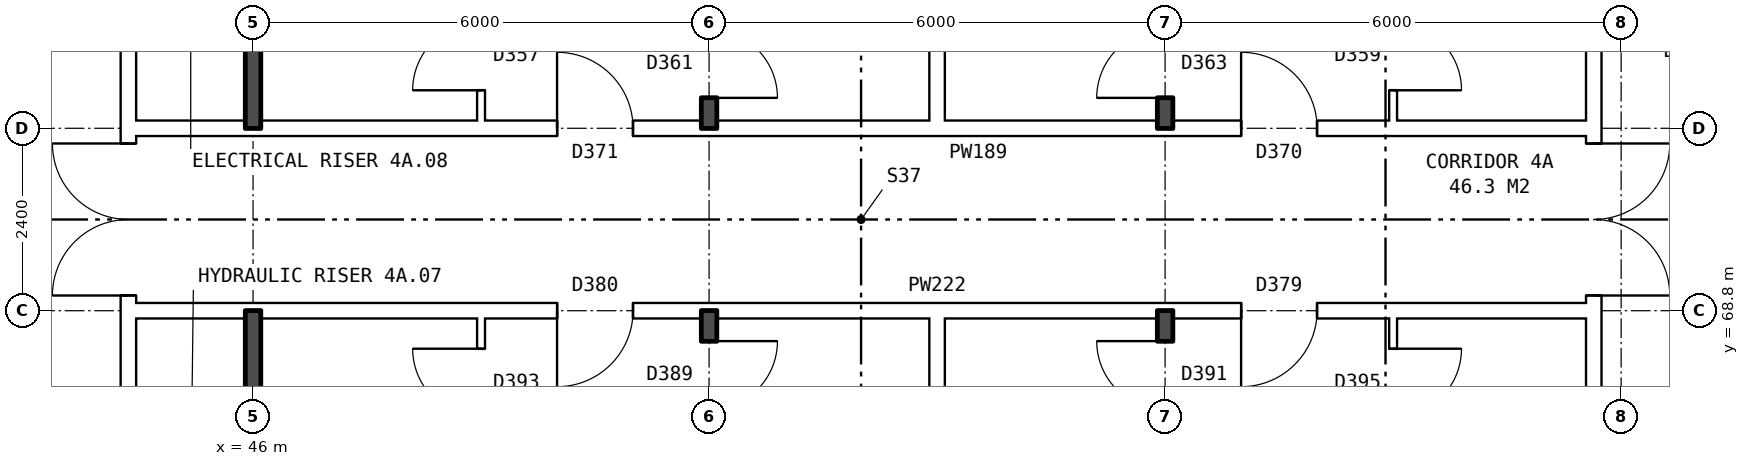
"""IFC4 building model, lengths in metres.
Left out: names, types, materials, properties, quantities, classifications, styles, units other than length and angle.
Written with IfcOpenShell. Run it as: python <this file> out.ifc"""

import sys

from ifc_helpers import new_model, si_unit, direction, frame, frame_2d, origin, place, context, subcontext, project, spatial, rectangle, extrude, element, fill, save


model = new_model("IFC4")
c1 = context("Model", 3, precision=1e-05, world=origin(), true_north=direction((0.0, 1.0)))
c2 = subcontext(c1, "Body", "Model", "MODEL_VIEW")
j1 = project(units=[si_unit("LENGTHUNIT", "METRE"), si_unit("PLANEANGLEUNIT", "RADIAN")], contexts=[c1])
p1 = place(None, origin())
s1 = spatial("IfcSite", under=j1, at=p1, CompositionType="ELEMENT")
p2 = place(p1, origin())
s2 = spatial("IfcBuilding", under=s1, at=p2, CompositionType="ELEMENT")
p3 = place(p2, frame((0.0, 0.0, 19.5)))
s3 = spatial("IfcBuildingStorey", under=s2, at=p3, CompositionType="ELEMENT", Elevation=19.5)
p4 = place(p3, frame((63.64, 63.9, 0.0), z_axis=(0.0, 0.0, 1.0), x_axis=(0.0, 1.0, 0.0)))
e1 = element("IfcWall", 1, at=p4, inside=s3, PredefinedType="PARTITIONING", context=c2, shape_type="SweptSolid", body=[
    extrude(rectangle(XDim=12.2, YDim=0.2, at=frame_2d((6.1, 0.0))), origin(), (0.0, 0.0, 1.0), 2.85),
])
p5 = place(p4, frame((5.1, 0.0, 0.0)))
e2 = element("IfcOpeningElement", 2, at=p5, cuts=e1, PredefinedType="OPENING", context=c2, shape_type="SweptSolid", body=[
    extrude(rectangle(XDim=2.0, YDim=2.1, at=frame_2d((1.0, 1.05))), frame((0.0, 0.11, 0.0), z_axis=(0.0, -1.0, 0.0), x_axis=(1.0, 0.0, 0.0)), (0.0, 0.0, 1.0), 0.22),
])
p6 = place(p3, frame((44.36, 63.9, 0.0), z_axis=(0.0, 0.0, 1.0), x_axis=(0.0, 1.0, 0.0)))
e3 = element("IfcWall", 3, at=p6, inside=s3, PredefinedType="PARTITIONING", context=c2, shape_type="SweptSolid", body=[
    extrude(rectangle(XDim=12.2, YDim=0.2, at=frame_2d((6.1, 0.0))), origin(), (0.0, 0.0, 1.0), 2.85),
])
p7 = place(p6, frame((5.1, 0.0, 0.0)))
e4 = element("IfcOpeningElement", 4, at=p7, cuts=e3, PredefinedType="OPENING", context=c2, shape_type="SweptSolid", body=[
    extrude(rectangle(XDim=2.0, YDim=2.1, at=frame_2d((1.0, 1.05))), frame((0.0, 0.11, 0.0), z_axis=(0.0, -1.0, 0.0), x_axis=(1.0, 0.0, 0.0)), (0.0, 0.0, 1.0), 0.22),
])
p8 = place(p3, frame((44.36, 68.8, 0.0), z_axis=(0.0, 0.0, 1.0), x_axis=(1.0, 0.0, 0.0)))
e5 = element("IfcWall", 5, at=p8, inside=s3, PredefinedType="PARTITIONING", context=c2, shape_type="SweptSolid", body=[
    extrude(rectangle(XDim=19.28, YDim=0.2, at=frame_2d((9.64, 0.0))), origin(), (0.0, 0.0, 1.0), 2.85),
])
p9 = place(p8, frame((14.64, 0.0, 0.0)))
e6 = element("IfcOpeningElement", 6, at=p9, cuts=e5, PredefinedType="OPENING", context=c2, shape_type="SweptSolid", body=[
    extrude(rectangle(XDim=1.0, YDim=2.1, at=frame_2d((0.5, 1.05))), frame((0.0, 0.11, 0.0), z_axis=(0.0, -1.0, 0.0), x_axis=(1.0, 0.0, 0.0)), (0.0, 0.0, 1.0), 0.22),
])
p10 = place(p8, frame((5.64, 0.0, 0.0)))
e7 = element("IfcOpeningElement", 7, at=p10, cuts=e5, PredefinedType="OPENING", context=c2, shape_type="SweptSolid", body=[
    extrude(rectangle(XDim=1.0, YDim=2.1, at=frame_2d((0.5, 1.05))), frame((0.0, 0.11, 0.0), z_axis=(0.0, -1.0, 0.0), x_axis=(1.0, 0.0, 0.0)), (0.0, 0.0, 1.0), 0.22),
])
p11 = place(p3, frame((44.36, 71.2, 0.0), z_axis=(0.0, 0.0, 1.0), x_axis=(1.0, 0.0, 0.0)))
e8 = element("IfcWall", 8, at=p11, inside=s3, PredefinedType="PARTITIONING", context=c2, shape_type="SweptSolid", body=[
    extrude(rectangle(XDim=19.28, YDim=0.2, at=frame_2d((9.64, 0.0))), origin(), (0.0, 0.0, 1.0), 2.85),
])
p12 = place(p11, frame((14.64, 0.0, 0.0)))
e9 = element("IfcOpeningElement", 9, at=p12, cuts=e8, PredefinedType="OPENING", context=c2, shape_type="SweptSolid", body=[
    extrude(rectangle(XDim=1.0, YDim=2.1, at=frame_2d((0.5, 1.05))), frame((0.0, 0.11, 0.0), z_axis=(0.0, -1.0, 0.0), x_axis=(1.0, 0.0, 0.0)), (0.0, 0.0, 1.0), 0.22),
])
p13 = place(p11, frame((5.64, 0.0, 0.0)))
e10 = element("IfcOpeningElement", 10, at=p13, cuts=e8, PredefinedType="OPENING", context=c2, shape_type="SweptSolid", body=[
    extrude(rectangle(XDim=1.0, YDim=2.1, at=frame_2d((0.5, 1.05))), frame((0.0, 0.11, 0.0), z_axis=(0.0, -1.0, 0.0), x_axis=(1.0, 0.0, 0.0)), (0.0, 0.0, 1.0), 0.22),
])
for number, where, z_axis, x_axis in (
    (11, (46.0, 63.8, 0.0), (0.0, 0.0, 1.0), (0.0, 1.0, 0.0)),
    (12, (46.0, 71.2, 0.0), (0.0, 0.0, 1.0), (0.0, 1.0, 0.0)),
):
    element("IfcWall", number, at=place(p3, frame(where, z_axis=z_axis, x_axis=x_axis)), inside=s3, PredefinedType="SOLIDWALL", context=c2, shape_type="SweptSolid", body=[
        extrude(rectangle(XDim=5.0, YDim=0.2, at=frame_2d((2.5, 0.0))), origin(), (0.0, 0.0, 1.0), 2.85),
    ])
p14 = place(p3, frame((49.0, 54.36, 0.0), z_axis=(0.0, 0.0, 1.0), x_axis=(0.0, 1.0, 0.0)))
e13 = element("IfcWall", 13, at=p14, inside=s3, PredefinedType="PARTITIONING", context=c2, shape_type="SweptSolid", body=[
    extrude(rectangle(XDim=14.34, YDim=0.1, at=frame_2d((7.17, 0.0))), origin(), (0.0, 0.0, 1.0), 2.85),
])
p15 = place(p14, frame((6.7, 0.0, 0.0)))
e14 = element("IfcOpeningElement", 14, at=p15, cuts=e13, PredefinedType="OPENING", context=c2, shape_type="SweptSolid", body=[
    extrude(rectangle(XDim=0.9, YDim=2.1, at=frame_2d((0.45, 1.05))), frame((0.0, 0.06, 0.0), z_axis=(0.0, -1.0, 0.0), x_axis=(1.0, 0.0, 0.0)), (0.0, 0.0, 1.0), 0.12),
])
p16 = place(p14, frame((13.04, 0.0, 0.0)))
e15 = element("IfcOpeningElement", 15, at=p16, cuts=e13, PredefinedType="OPENING", context=c2, shape_type="SweptSolid", body=[
    extrude(rectangle(XDim=0.9, YDim=2.1, at=frame_2d((0.45, 1.05))), frame((0.0, 0.06, 0.0), z_axis=(0.0, -1.0, 0.0), x_axis=(1.0, 0.0, 0.0)), (0.0, 0.0, 1.0), 0.12),
])
p17 = place(p3, frame((49.0, 71.3, 0.0), z_axis=(0.0, 0.0, 1.0), x_axis=(0.0, 1.0, 0.0)))
e16 = element("IfcWall", 16, at=p17, inside=s3, PredefinedType="PARTITIONING", context=c2, shape_type="SweptSolid", body=[
    extrude(rectangle(XDim=14.34, YDim=0.1, at=frame_2d((7.17, 0.0))), origin(), (0.0, 0.0, 1.0), 2.85),
])
p18 = place(p17, frame((9.24, 0.0, 0.0)))
e17 = element("IfcOpeningElement", 17, at=p18, cuts=e16, PredefinedType="OPENING", context=c2, shape_type="SweptSolid", body=[
    extrude(rectangle(XDim=0.9, YDim=2.1, at=frame_2d((0.45, 1.05))), frame((0.0, 0.06, 0.0), z_axis=(0.0, -1.0, 0.0), x_axis=(1.0, 0.0, 0.0)), (0.0, 0.0, 1.0), 0.12),
])
p19 = place(p17, frame((0.4, 0.0, 0.0)))
e18 = element("IfcOpeningElement", 18, at=p19, cuts=e16, PredefinedType="OPENING", context=c2, shape_type="SweptSolid", body=[
    extrude(rectangle(XDim=0.9, YDim=2.1, at=frame_2d((0.45, 1.05))), frame((0.0, 0.06, 0.0), z_axis=(0.0, -1.0, 0.0), x_axis=(1.0, 0.0, 0.0)), (0.0, 0.0, 1.0), 0.12),
])
p20 = place(p3, frame((52.0, 54.36, 0.0), z_axis=(0.0, 0.0, 1.0), x_axis=(0.0, 1.0, 0.0)))
e19 = element("IfcWall", 19, at=p20, inside=s3, PredefinedType="SOLIDWALL", context=c2, shape_type="SweptSolid", body=[
    extrude(rectangle(XDim=14.44, YDim=0.2, at=frame_2d((7.22, 0.0))), origin(), (0.0, 0.0, 1.0), 2.85),
])
p21 = place(p20, frame((6.7, 0.0, 0.0)))
e20 = element("IfcOpeningElement", 20, at=p21, cuts=e19, PredefinedType="OPENING", context=c2, shape_type="SweptSolid", body=[
    extrude(rectangle(XDim=0.9, YDim=2.1, at=frame_2d((0.45, 1.05))), frame((0.0, 0.11, 0.0), z_axis=(0.0, -1.0, 0.0), x_axis=(1.0, 0.0, 0.0)), (0.0, 0.0, 1.0), 0.22),
])
p22 = place(p20, frame((13.14, 0.0, 0.0)))
e21 = element("IfcOpeningElement", 21, at=p22, cuts=e19, PredefinedType="OPENING", context=c2, shape_type="SweptSolid", body=[
    extrude(rectangle(XDim=0.9, YDim=2.1, at=frame_2d((0.45, 1.05))), frame((0.0, 0.11, 0.0), z_axis=(0.0, -1.0, 0.0), x_axis=(1.0, 0.0, 0.0)), (0.0, 0.0, 1.0), 0.22),
])
p23 = place(p3, frame((52.0, 71.2, 0.0), z_axis=(0.0, 0.0, 1.0), x_axis=(0.0, 1.0, 0.0)))
e22 = element("IfcWall", 22, at=p23, inside=s3, PredefinedType="SOLIDWALL", context=c2, shape_type="SweptSolid", body=[
    extrude(rectangle(XDim=14.44, YDim=0.2, at=frame_2d((7.22, 0.0))), origin(), (0.0, 0.0, 1.0), 2.85),
])
p24 = place(p23, frame((9.34, 0.0, 0.0)))
e23 = element("IfcOpeningElement", 23, at=p24, cuts=e22, PredefinedType="OPENING", context=c2, shape_type="SweptSolid", body=[
    extrude(rectangle(XDim=0.9, YDim=2.1, at=frame_2d((0.45, 1.05))), frame((0.0, 0.11, 0.0), z_axis=(0.0, -1.0, 0.0), x_axis=(1.0, 0.0, 0.0)), (0.0, 0.0, 1.0), 0.22),
])
p25 = place(p23, frame((0.4, 0.0, 0.0)))
e24 = element("IfcOpeningElement", 24, at=p25, cuts=e22, PredefinedType="OPENING", context=c2, shape_type="SweptSolid", body=[
    extrude(rectangle(XDim=0.9, YDim=2.1, at=frame_2d((0.45, 1.05))), frame((0.0, 0.11, 0.0), z_axis=(0.0, -1.0, 0.0), x_axis=(1.0, 0.0, 0.0)), (0.0, 0.0, 1.0), 0.22),
])
for number, where, z_axis, x_axis in (
    (25, (55.0, 54.36, 0.0), (0.0, 0.0, 1.0), (0.0, 1.0, 0.0)),
    (26, (55.0, 71.3, 0.0), (0.0, 0.0, 1.0), (0.0, 1.0, 0.0)),
):
    element("IfcWall", number, at=place(p3, frame(where, z_axis=z_axis, x_axis=x_axis)), inside=s3, PredefinedType="PARTITIONING", context=c2, shape_type="SweptSolid", body=[
        extrude(rectangle(XDim=14.34, YDim=0.2, at=frame_2d((7.17, 0.0))), origin(), (0.0, 0.0, 1.0), 2.85),
    ])
p26 = place(p3, frame((58.0, 54.36, 0.0), z_axis=(0.0, 0.0, 1.0), x_axis=(0.0, 1.0, 0.0)))
e27 = element("IfcWall", 27, at=p26, inside=s3, PredefinedType="SOLIDWALL", context=c2, shape_type="SweptSolid", body=[
    extrude(rectangle(XDim=14.44, YDim=0.2, at=frame_2d((7.22, 0.0))), origin(), (0.0, 0.0, 1.0), 2.85),
])
p27 = place(p26, frame((7.7, 0.0, 0.0)))
e28 = element("IfcOpeningElement", 28, at=p27, cuts=e27, PredefinedType="OPENING", context=c2, shape_type="SweptSolid", body=[
    extrude(rectangle(XDim=0.9, YDim=2.1, at=frame_2d((0.45, 1.05))), frame((0.0, 0.11, 0.0), z_axis=(0.0, -1.0, 0.0), x_axis=(1.0, 0.0, 0.0)), (0.0, 0.0, 1.0), 0.22),
])
p28 = place(p26, frame((13.14, 0.0, 0.0)))
e29 = element("IfcOpeningElement", 29, at=p28, cuts=e27, PredefinedType="OPENING", context=c2, shape_type="SweptSolid", body=[
    extrude(rectangle(XDim=0.9, YDim=2.1, at=frame_2d((0.45, 1.05))), frame((0.0, 0.11, 0.0), z_axis=(0.0, -1.0, 0.0), x_axis=(1.0, 0.0, 0.0)), (0.0, 0.0, 1.0), 0.22),
])
p29 = place(p3, frame((58.0, 71.2, 0.0), z_axis=(0.0, 0.0, 1.0), x_axis=(0.0, 1.0, 0.0)))
e30 = element("IfcWall", 30, at=p29, inside=s3, PredefinedType="SOLIDWALL", context=c2, shape_type="SweptSolid", body=[
    extrude(rectangle(XDim=14.44, YDim=0.2, at=frame_2d((7.22, 0.0))), origin(), (0.0, 0.0, 1.0), 2.85),
])
p30 = place(p29, frame((9.34, 0.0, 0.0)))
e31 = element("IfcOpeningElement", 31, at=p30, cuts=e30, PredefinedType="OPENING", context=c2, shape_type="SweptSolid", body=[
    extrude(rectangle(XDim=0.9, YDim=2.1, at=frame_2d((0.45, 1.05))), frame((0.0, 0.11, 0.0), z_axis=(0.0, -1.0, 0.0), x_axis=(1.0, 0.0, 0.0)), (0.0, 0.0, 1.0), 0.22),
])
p31 = place(p29, frame((0.4, 0.0, 0.0)))
e32 = element("IfcOpeningElement", 32, at=p31, cuts=e30, PredefinedType="OPENING", context=c2, shape_type="SweptSolid", body=[
    extrude(rectangle(XDim=0.9, YDim=2.1, at=frame_2d((0.45, 1.05))), frame((0.0, 0.11, 0.0), z_axis=(0.0, -1.0, 0.0), x_axis=(1.0, 0.0, 0.0)), (0.0, 0.0, 1.0), 0.22),
])
p32 = place(p3, frame((61.0, 54.36, 0.0), z_axis=(0.0, 0.0, 1.0), x_axis=(0.0, 1.0, 0.0)))
e33 = element("IfcWall", 33, at=p32, inside=s3, PredefinedType="PARTITIONING", context=c2, shape_type="SweptSolid", body=[
    extrude(rectangle(XDim=14.34, YDim=0.1, at=frame_2d((7.17, 0.0))), origin(), (0.0, 0.0, 1.0), 2.85),
])
p33 = place(p32, frame((7.7, 0.0, 0.0)))
e34 = element("IfcOpeningElement", 34, at=p33, cuts=e33, PredefinedType="OPENING", context=c2, shape_type="SweptSolid", body=[
    extrude(rectangle(XDim=0.9, YDim=2.1, at=frame_2d((0.45, 1.05))), frame((0.0, 0.06, 0.0), z_axis=(0.0, -1.0, 0.0), x_axis=(1.0, 0.0, 0.0)), (0.0, 0.0, 1.0), 0.12),
])
p34 = place(p32, frame((13.04, 0.0, 0.0)))
e35 = element("IfcOpeningElement", 35, at=p34, cuts=e33, PredefinedType="OPENING", context=c2, shape_type="SweptSolid", body=[
    extrude(rectangle(XDim=0.9, YDim=2.1, at=frame_2d((0.45, 1.05))), frame((0.0, 0.06, 0.0), z_axis=(0.0, -1.0, 0.0), x_axis=(1.0, 0.0, 0.0)), (0.0, 0.0, 1.0), 0.12),
])
p35 = place(p3, frame((61.0, 71.3, 0.0), z_axis=(0.0, 0.0, 1.0), x_axis=(0.0, 1.0, 0.0)))
e36 = element("IfcWall", 36, at=p35, inside=s3, PredefinedType="PARTITIONING", context=c2, shape_type="SweptSolid", body=[
    extrude(rectangle(XDim=14.34, YDim=0.1, at=frame_2d((7.17, 0.0))), origin(), (0.0, 0.0, 1.0), 2.85),
])
p36 = place(p35, frame((9.24, 0.0, 0.0)))
e37 = element("IfcOpeningElement", 37, at=p36, cuts=e36, PredefinedType="OPENING", context=c2, shape_type="SweptSolid", body=[
    extrude(rectangle(XDim=0.9, YDim=2.1, at=frame_2d((0.45, 1.05))), frame((0.0, 0.06, 0.0), z_axis=(0.0, -1.0, 0.0), x_axis=(1.0, 0.0, 0.0)), (0.0, 0.0, 1.0), 0.12),
])
p37 = place(p35, frame((0.4, 0.0, 0.0)))
e38 = element("IfcOpeningElement", 38, at=p37, cuts=e36, PredefinedType="OPENING", context=c2, shape_type="SweptSolid", body=[
    extrude(rectangle(XDim=0.9, YDim=2.1, at=frame_2d((0.45, 1.05))), frame((0.0, 0.06, 0.0), z_axis=(0.0, -1.0, 0.0), x_axis=(1.0, 0.0, 0.0)), (0.0, 0.0, 1.0), 0.12),
])
p38 = place(p5, frame((2.0, 0.0, 0.0), z_axis=(0.0, 0.0, 1.0), x_axis=(-1.0, 0.0, 0.0)))
e39 = element("IfcDoor", 39, at=p38, inside=s3, OperationType="DOUBLE_DOOR_SINGLE_SWING", PredefinedType="DOOR", context=c2, shape_type="SweptSolid", body=[
    extrude(rectangle(XDim=2.0, YDim=2.1, at=frame_2d((1.0, 1.05))), frame((0.0, 0.025, 0.0), z_axis=(0.0, -1.0, 0.0), x_axis=(1.0, 0.0, 0.0)), (0.0, 0.0, 1.0), 0.05),
])
fill(e2, e39)
p39 = place(p7, origin())
e40 = element("IfcDoor", 40, at=p39, inside=s3, OperationType="DOUBLE_DOOR_SINGLE_SWING", PredefinedType="DOOR", context=c2, shape_type="SweptSolid", body=[
    extrude(rectangle(XDim=2.0, YDim=2.1, at=frame_2d((1.0, 1.05))), frame((0.0, 0.025, 0.0), z_axis=(0.0, -1.0, 0.0), x_axis=(1.0, 0.0, 0.0)), (0.0, 0.0, 1.0), 0.05),
])
fill(e4, e40)
p40 = place(p9, frame((1.0, 0.0, 0.0), z_axis=(0.0, 0.0, 1.0), x_axis=(-1.0, 0.0, 0.0)))
e41 = element("IfcDoor", 41, at=p40, inside=s3, OperationType="SINGLE_SWING_RIGHT", PredefinedType="DOOR", context=c2, shape_type="SweptSolid", body=[
    extrude(rectangle(XDim=1.0, YDim=2.1, at=frame_2d((0.5, 1.05))), frame((0.0, 0.025, 0.0), z_axis=(0.0, -1.0, 0.0), x_axis=(1.0, 0.0, 0.0)), (0.0, 0.0, 1.0), 0.05),
])
fill(e6, e41)
p41 = place(p34, frame((0.9, 0.0, 0.0), z_axis=(0.0, 0.0, 1.0), x_axis=(-1.0, 0.0, 0.0)))
e42 = element("IfcDoor", 42, at=p41, inside=s3, OperationType="SINGLE_SWING_LEFT", PredefinedType="DOOR", context=c2, shape_type="SweptSolid", body=[
    extrude(rectangle(XDim=0.9, YDim=2.1, at=frame_2d((0.45, 1.05))), frame((0.0, 0.025, 0.0), z_axis=(0.0, -1.0, 0.0), x_axis=(1.0, 0.0, 0.0)), (0.0, 0.0, 1.0), 0.05),
])
fill(e35, e42)
p42 = place(p28, origin())
e43 = element("IfcDoor", 43, at=p42, inside=s3, OperationType="SINGLE_SWING_RIGHT", PredefinedType="DOOR", context=c2, shape_type="SweptSolid", body=[
    extrude(rectangle(XDim=0.9, YDim=2.1, at=frame_2d((0.45, 1.05))), frame((0.0, 0.025, 0.0), z_axis=(0.0, -1.0, 0.0), x_axis=(1.0, 0.0, 0.0)), (0.0, 0.0, 1.0), 0.05),
])
fill(e29, e43)
p43 = place(p10, frame((1.0, 0.0, 0.0), z_axis=(0.0, 0.0, 1.0), x_axis=(-1.0, 0.0, 0.0)))
e44 = element("IfcDoor", 44, at=p43, inside=s3, OperationType="SINGLE_SWING_RIGHT", PredefinedType="DOOR", context=c2, shape_type="SweptSolid", body=[
    extrude(rectangle(XDim=1.0, YDim=2.1, at=frame_2d((0.5, 1.05))), frame((0.0, 0.025, 0.0), z_axis=(0.0, -1.0, 0.0), x_axis=(1.0, 0.0, 0.0)), (0.0, 0.0, 1.0), 0.05),
])
fill(e7, e44)
p44 = place(p22, frame((0.9, 0.0, 0.0), z_axis=(0.0, 0.0, 1.0), x_axis=(-1.0, 0.0, 0.0)))
e45 = element("IfcDoor", 45, at=p44, inside=s3, OperationType="SINGLE_SWING_LEFT", PredefinedType="DOOR", context=c2, shape_type="SweptSolid", body=[
    extrude(rectangle(XDim=0.9, YDim=2.1, at=frame_2d((0.45, 1.05))), frame((0.0, 0.025, 0.0), z_axis=(0.0, -1.0, 0.0), x_axis=(1.0, 0.0, 0.0)), (0.0, 0.0, 1.0), 0.05),
])
fill(e21, e45)
p45 = place(p16, origin())
e46 = element("IfcDoor", 46, at=p45, inside=s3, OperationType="SINGLE_SWING_RIGHT", PredefinedType="DOOR", context=c2, shape_type="SweptSolid", body=[
    extrude(rectangle(XDim=0.9, YDim=2.1, at=frame_2d((0.45, 1.05))), frame((0.0, 0.025, 0.0), z_axis=(0.0, -1.0, 0.0), x_axis=(1.0, 0.0, 0.0)), (0.0, 0.0, 1.0), 0.05),
])
fill(e15, e46)
p46 = place(p12, origin())
e47 = element("IfcDoor", 47, at=p46, inside=s3, OperationType="SINGLE_SWING_LEFT", PredefinedType="DOOR", context=c2, shape_type="SweptSolid", body=[
    extrude(rectangle(XDim=1.0, YDim=2.1, at=frame_2d((0.5, 1.05))), frame((0.0, 0.025, 0.0), z_axis=(0.0, -1.0, 0.0), x_axis=(1.0, 0.0, 0.0)), (0.0, 0.0, 1.0), 0.05),
])
fill(e9, e47)
p47 = place(p37, frame((0.9, 0.0, 0.0), z_axis=(0.0, 0.0, 1.0), x_axis=(-1.0, 0.0, 0.0)))
e48 = element("IfcDoor", 48, at=p47, inside=s3, OperationType="SINGLE_SWING_RIGHT", PredefinedType="DOOR", context=c2, shape_type="SweptSolid", body=[
    extrude(rectangle(XDim=0.9, YDim=2.1, at=frame_2d((0.45, 1.05))), frame((0.0, 0.025, 0.0), z_axis=(0.0, -1.0, 0.0), x_axis=(1.0, 0.0, 0.0)), (0.0, 0.0, 1.0), 0.05),
])
fill(e38, e48)
p48 = place(p31, origin())
e49 = element("IfcDoor", 49, at=p48, inside=s3, OperationType="SINGLE_SWING_LEFT", PredefinedType="DOOR", context=c2, shape_type="SweptSolid", body=[
    extrude(rectangle(XDim=0.9, YDim=2.1, at=frame_2d((0.45, 1.05))), frame((0.0, 0.025, 0.0), z_axis=(0.0, -1.0, 0.0), x_axis=(1.0, 0.0, 0.0)), (0.0, 0.0, 1.0), 0.05),
])
fill(e32, e49)
p49 = place(p13, origin())
e50 = element("IfcDoor", 50, at=p49, inside=s3, OperationType="SINGLE_SWING_LEFT", PredefinedType="DOOR", context=c2, shape_type="SweptSolid", body=[
    extrude(rectangle(XDim=1.0, YDim=2.1, at=frame_2d((0.5, 1.05))), frame((0.0, 0.025, 0.0), z_axis=(0.0, -1.0, 0.0), x_axis=(1.0, 0.0, 0.0)), (0.0, 0.0, 1.0), 0.05),
])
fill(e10, e50)
p50 = place(p25, frame((0.9, 0.0, 0.0), z_axis=(0.0, 0.0, 1.0), x_axis=(-1.0, 0.0, 0.0)))
e51 = element("IfcDoor", 51, at=p50, inside=s3, OperationType="SINGLE_SWING_RIGHT", PredefinedType="DOOR", context=c2, shape_type="SweptSolid", body=[
    extrude(rectangle(XDim=0.9, YDim=2.1, at=frame_2d((0.45, 1.05))), frame((0.0, 0.025, 0.0), z_axis=(0.0, -1.0, 0.0), x_axis=(1.0, 0.0, 0.0)), (0.0, 0.0, 1.0), 0.05),
])
fill(e24, e51)
p51 = place(p19, origin())
e52 = element("IfcDoor", 52, at=p51, inside=s3, OperationType="SINGLE_SWING_LEFT", PredefinedType="DOOR", context=c2, shape_type="SweptSolid", body=[
    extrude(rectangle(XDim=0.9, YDim=2.1, at=frame_2d((0.45, 1.05))), frame((0.0, 0.025, 0.0), z_axis=(0.0, -1.0, 0.0), x_axis=(1.0, 0.0, 0.0)), (0.0, 0.0, 1.0), 0.05),
])
fill(e18, e52)
save(model, sys.argv[1])
